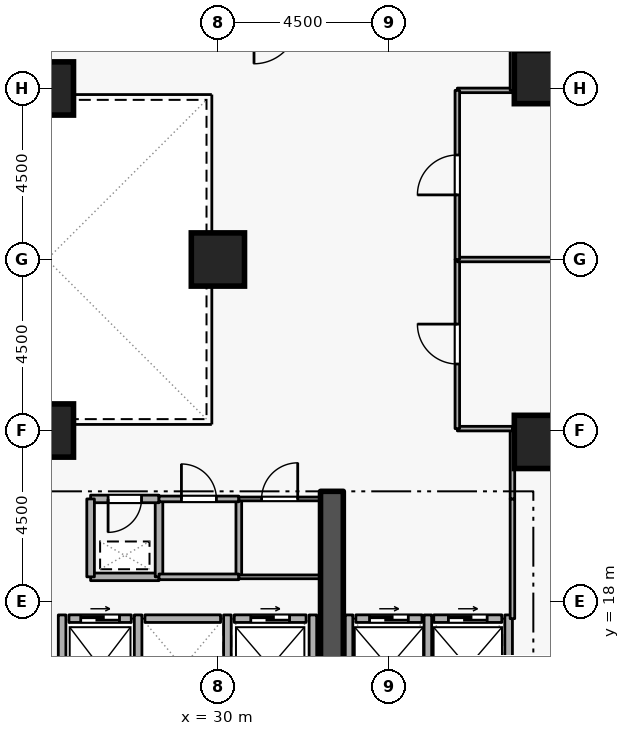
"""IFC4 building model, lengths in metres.
Left out: names, types, materials, properties, quantities, classifications, styles, units other than length and angle.
Written with IfcOpenShell. Run it as: python <this file> out.ifc"""

import sys

from ifc_helpers import new_model, si_unit, direction, frame, frame_2d, origin, origin_2d, place, context, subcontext, project, spatial, rectangle, extrude, element, fill, save


model = new_model("IFC4")
c1 = context("Model", 3, precision=1e-05, world=origin(), true_north=direction((0.0, 1.0)))
c2 = subcontext(c1, "Body", "Model", "MODEL_VIEW")
j1 = project(units=[si_unit("LENGTHUNIT", "METRE"), si_unit("PLANEANGLEUNIT", "RADIAN")], contexts=[c1])
p1 = place(None, origin())
s1 = spatial("IfcSite", under=j1, at=p1, CompositionType="ELEMENT")
p2 = place(p1, origin())
s2 = spatial("IfcBuilding", under=s1, at=p2, CompositionType="ELEMENT")
p3 = place(p2, frame((0.0, 0.0, 49.5)))
s3 = spatial("IfcBuildingStorey", under=s2, at=p3, CompositionType="ELEMENT", Elevation=49.5)
p4 = place(p3, frame((33.0, 15.2, 0.0), z_axis=(0.0, 0.0, 1.0), x_axis=(0.0, 1.0, 0.0)))
e1 = element("IfcWall", 1, at=p4, inside=s3, PredefinedType="SHEAR", context=c2, shape_type="SweptSolid", body=[
    extrude(rectangle(XDim=5.7, YDim=0.6, at=frame_2d((2.85, 0.0))), origin(), (0.0, 0.0, 1.0), 4.2),
])
for number, where, z_axis, x_axis in (
    (2, (38.5, 22.2, 0.0), (0.0, 0.0, 1.0), (1.0, 0.0, 0.0)),
    (3, (38.5, 31.8, 0.0), (0.0, 0.0, 1.0), (1.0, 0.0, 0.0)),
    (4, (25.5, 22.5, 0.0), (0.0, 0.0, 1.0), (1.0, 0.0, 0.0)),
    (5, (25.5, 31.5, 0.0), (0.0, 0.0, 1.0), (1.0, 0.0, 0.0)),
    (6, (30.0, 27.0, 0.0), (0.0, 0.0, 1.0), (1.0, 0.0, 0.0)),
):
    element("IfcColumn", number, at=place(p3, frame(where, z_axis=z_axis, x_axis=x_axis)), inside=s3, PredefinedType="COLUMN", context=c2, shape_type="SweptSolid", body=[
        extrude(rectangle(XDim=1.4, YDim=1.4, at=origin_2d()), origin(), (0.0, 0.0, 1.0), 4.2),
    ])
p5 = place(p3, frame((26.08, 17.55, 0.0), z_axis=(0.0, 0.0, 1.0), x_axis=(1.0, 0.0, 0.0)))
e7 = element("IfcWall", 7, at=p5, inside=s3, PredefinedType="STANDARD", context=c2, shape_type="SweptSolid", body=[
    extrude(rectangle(XDim=1.64, YDim=0.2, at=frame_2d((0.82, 0.0))), origin(), (0.0, 0.0, 1.0), 3.94),
])
p6 = place(p5, frame((0.31, 0.0, 0.0)))
e8 = element("IfcOpeningElement", 8, at=p6, cuts=e7, PredefinedType="OPENING", context=c2, shape_type="SweptSolid", body=[
    extrude(rectangle(XDim=1.02, YDim=2.06, at=frame_2d((0.51, 1.03))), frame((0.0, 0.11, 0.0), z_axis=(0.0, -1.0, 0.0), x_axis=(1.0, 0.0, 0.0)), (0.0, 0.0, 1.0), 0.22),
])
p7 = place(p3, frame((28.08, 17.55, 0.0), z_axis=(0.0, 0.0, 1.0), x_axis=(1.0, 0.0, 0.0)))
e9 = element("IfcWall", 9, at=p7, inside=s3, PredefinedType="STANDARD", context=c2, shape_type="SweptSolid", body=[
    extrude(rectangle(XDim=1.99, YDim=0.2, at=frame_2d((0.995, 0.0))), origin(), (0.0, 0.0, 1.0), 3.94),
])
p8 = place(p3, frame((30.43, 17.55, 0.0), z_axis=(0.0, 0.0, 1.0), x_axis=(1.0, 0.0, 0.0)))
e10 = element("IfcWall", 10, at=p8, inside=s3, PredefinedType="STANDARD", context=c2, shape_type="SweptSolid", body=[
    extrude(rectangle(XDim=1.89, YDim=0.2, at=frame_2d((0.945, 0.0))), origin(), (0.0, 0.0, 1.0), 3.94),
])
p9 = place(p8, frame((0.435, 0.0, 0.0)))
e11 = element("IfcOpeningElement", 11, at=p9, cuts=e10, PredefinedType="OPENING", context=c2, shape_type="SweptSolid", body=[
    extrude(rectangle(XDim=1.02, YDim=2.06, at=frame_2d((0.51, 1.03))), frame((0.0, 0.11, 0.0), z_axis=(0.0, -1.0, 0.0), x_axis=(1.0, 0.0, 0.0)), (0.0, 0.0, 1.0), 0.22),
])
p10 = place(p3, frame((33.63, 17.55, 0.0), z_axis=(0.0, 0.0, 1.0), x_axis=(1.0, 0.0, 0.0)))
e12 = element("IfcWall", 12, at=p10, inside=s3, PredefinedType="STANDARD", context=c2, shape_type="SweptSolid", body=[
    extrude(rectangle(XDim=1.74, YDim=0.2, at=frame_2d((0.87, 0.0))), origin(), (0.0, 0.0, 1.0), 3.94),
])
p11 = place(p10, frame((0.36, 0.0, 0.0)))
e13 = element("IfcOpeningElement", 13, at=p11, cuts=e12, PredefinedType="OPENING", context=c2, shape_type="SweptSolid", body=[
    extrude(rectangle(XDim=1.02, YDim=2.06, at=frame_2d((0.51, 1.03))), frame((0.0, 0.11, 0.0), z_axis=(0.0, -1.0, 0.0), x_axis=(1.0, 0.0, 0.0)), (0.0, 0.0, 1.0), 0.22),
])
p12 = place(p3, frame((35.68, 17.55, 0.0), z_axis=(0.0, 0.0, 1.0), x_axis=(1.0, 0.0, 0.0)))
e14 = element("IfcWall", 14, at=p12, inside=s3, PredefinedType="STANDARD", context=c2, shape_type="SweptSolid", body=[
    extrude(rectangle(XDim=1.79, YDim=0.2, at=frame_2d((0.895, 0.0))), origin(), (0.0, 0.0, 1.0), 3.94),
])
p13 = place(p12, frame((0.385, 0.0, 0.0)))
e15 = element("IfcOpeningElement", 15, at=p13, cuts=e14, PredefinedType="OPENING", context=c2, shape_type="SweptSolid", body=[
    extrude(rectangle(XDim=1.02, YDim=2.06, at=frame_2d((0.51, 1.03))), frame((0.0, 0.11, 0.0), z_axis=(0.0, -1.0, 0.0), x_axis=(1.0, 0.0, 0.0)), (0.0, 0.0, 1.0), 0.22),
])
for number, where, z_axis, x_axis in (
    (16, (27.9, 15.212, 0.0), (0.0, 0.0, 1.0), (0.0, 1.0, 0.0)),
    (17, (25.9, 15.212, 0.0), (0.0, 0.0, 1.0), (0.0, 1.0, 0.0)),
    (18, (30.25, 15.212, 0.0), (0.0, 0.0, 1.0), (0.0, 1.0, 0.0)),
    (19, (32.5, 15.212, 0.0), (0.0, 0.0, 1.0), (0.0, 1.0, 0.0)),
):
    element("IfcWall", number, at=place(p3, frame(where, z_axis=z_axis, x_axis=x_axis)), inside=s3, PredefinedType="STANDARD", context=c2, shape_type="SweptSolid", body=[
        extrude(rectangle(XDim=2.436, YDim=0.2, at=frame_2d((1.218, 0.0))), origin(), (0.0, 0.0, 1.0), 3.94),
    ])
for number, where, z_axis, x_axis in (
    (20, (35.525, 15.012, 0.0), (0.0, 0.0, 1.0), (0.0, 1.0, 0.0)),
    (21, (33.45, 15.012, 0.0), (0.0, 0.0, 1.0), (0.0, 1.0, 0.0)),
    (22, (37.65, 15.012, 0.0), (0.0, 0.0, 1.0), (0.0, 1.0, 0.0)),
):
    element("IfcWall", number, at=place(p3, frame(where, z_axis=z_axis, x_axis=x_axis)), inside=s3, PredefinedType="STANDARD", context=c2, shape_type="SweptSolid", body=[
        extrude(rectangle(XDim=2.636, YDim=0.2, at=frame_2d((1.318, 0.0))), origin(), (0.0, 0.0, 1.0), 3.94),
    ])
p14 = place(p3, frame((26.65, 18.65, 0.0), z_axis=(0.0, 0.0, 1.0), x_axis=(1.0, 0.0, 0.0)))
e23 = element("IfcWall", 23, at=p14, inside=s3, PredefinedType="STANDARD", context=c2, shape_type="SweptSolid", body=[
    extrude(rectangle(XDim=1.8, YDim=0.2, at=frame_2d((0.9, 0.0))), origin(), (0.0, 0.0, 1.0), 3.94),
])
p15 = place(p3, frame((28.45, 18.65, 0.0), z_axis=(0.0, 0.0, 1.0), x_axis=(0.0, 1.0, 0.0)))
e24 = element("IfcWall", 24, at=p15, inside=s3, PredefinedType="STANDARD", context=c2, shape_type="SweptSolid", body=[
    extrude(rectangle(XDim=2.05, YDim=0.2, at=frame_2d((1.025, 0.0))), origin(), (0.0, 0.0, 1.0), 3.94),
])
p16 = place(p3, frame((28.45, 20.7, 0.0), z_axis=(0.0, 0.0, 1.0), x_axis=(-1.0, 0.0, 0.0)))
e25 = element("IfcWall", 25, at=p16, inside=s3, PredefinedType="STANDARD", context=c2, shape_type="SweptSolid", body=[
    extrude(rectangle(XDim=1.8, YDim=0.2, at=frame_2d((0.9, 0.0))), origin(), (0.0, 0.0, 1.0), 3.94),
])
p17 = place(p16, frame((0.46, 0.0, 0.0)))
e26 = element("IfcOpeningElement", 26, at=p17, cuts=e25, PredefinedType="OPENING", context=c2, shape_type="SweptSolid", body=[
    extrude(rectangle(XDim=0.88, YDim=2.04, at=frame_2d((0.44, 1.02))), frame((0.0, 0.11, 0.0), z_axis=(0.0, -1.0, 0.0), x_axis=(1.0, 0.0, 0.0)), (0.0, 0.0, 1.0), 0.22),
])
p18 = place(p3, frame((26.65, 20.7, 0.0), z_axis=(0.0, 0.0, 1.0), x_axis=(0.0, -1.0, 0.0)))
e27 = element("IfcWall", 27, at=p18, inside=s3, PredefinedType="STANDARD", context=c2, shape_type="SweptSolid", body=[
    extrude(rectangle(XDim=2.05, YDim=0.2, at=frame_2d((1.025, 0.0))), origin(), (0.0, 0.0, 1.0), 3.94),
])
p19 = place(p3, frame((30.55, 20.7, 0.0), z_axis=(0.0, 0.0, 1.0), x_axis=(0.0, -1.0, 0.0)))
e28 = element("IfcWall", 28, at=p19, inside=s3, PredefinedType="PARTITIONING", context=c2, shape_type="SweptSolid", body=[
    extrude(rectangle(XDim=2.05, YDim=0.15, at=frame_2d((1.025, 0.0))), origin(), (0.0, 0.0, 1.0), 3.94),
])
p20 = place(p3, frame((30.55, 18.65, 0.0), z_axis=(0.0, 0.0, 1.0), x_axis=(-1.0, 0.0, 0.0)))
e29 = element("IfcWall", 29, at=p20, inside=s3, PredefinedType="PARTITIONING", context=c2, shape_type="SweptSolid", body=[
    extrude(rectangle(XDim=2.1, YDim=0.15, at=frame_2d((1.05, 0.0))), origin(), (0.0, 0.0, 1.0), 3.94),
])
p21 = place(p3, frame((28.45, 20.7, 0.0), z_axis=(0.0, 0.0, 1.0), x_axis=(1.0, 0.0, 0.0)))
e30 = element("IfcWall", 30, at=p21, inside=s3, PredefinedType="PARTITIONING", context=c2, shape_type="SweptSolid", body=[
    extrude(rectangle(XDim=2.1, YDim=0.15, at=frame_2d((1.05, 0.0))), origin(), (0.0, 0.0, 1.0), 3.94),
])
p22 = place(p21, frame((0.59, 0.0, 0.0)))
e31 = element("IfcOpeningElement", 31, at=p22, cuts=e30, PredefinedType="OPENING", context=c2, shape_type="SweptSolid", body=[
    extrude(rectangle(XDim=0.92, YDim=2.08, at=frame_2d((0.46, 1.04))), frame((0.0, 0.085, 0.0), z_axis=(0.0, -1.0, 0.0), x_axis=(1.0, 0.0, 0.0)), (0.0, 0.0, 1.0), 0.17),
])
p23 = place(p3, frame((32.7, 18.65, 0.0), z_axis=(0.0, 0.0, 1.0), x_axis=(-1.0, 0.0, 0.0)))
e32 = element("IfcWall", 32, at=p23, inside=s3, PredefinedType="PARTITIONING", context=c2, shape_type="SweptSolid", body=[
    extrude(rectangle(XDim=2.15, YDim=0.1, at=frame_2d((1.075, 0.0))), origin(), (0.0, 0.0, 1.0), 3.94),
])
p24 = place(p3, frame((30.55, 20.7, 0.0), z_axis=(0.0, 0.0, 1.0), x_axis=(1.0, 0.0, 0.0)))
e33 = element("IfcWall", 33, at=p24, inside=s3, PredefinedType="PARTITIONING", context=c2, shape_type="SweptSolid", body=[
    extrude(rectangle(XDim=2.15, YDim=0.1, at=frame_2d((1.075, 0.0))), origin(), (0.0, 0.0, 1.0), 3.94),
])
p25 = place(p24, frame((0.6, 0.0, 0.0)))
e34 = element("IfcOpeningElement", 34, at=p25, cuts=e33, PredefinedType="OPENING", context=c2, shape_type="SweptSolid", body=[
    extrude(rectangle(XDim=0.95, YDim=2.1, at=frame_2d((0.475, 1.05))), frame((0.0, 0.06, 0.0), z_axis=(0.0, -1.0, 0.0), x_axis=(1.0, 0.0, 0.0)), (0.0, 0.0, 1.0), 0.12),
])
p26 = place(p3, frame((37.75, 17.55, 0.0), z_axis=(0.0, 0.0, 1.0), x_axis=(0.0, 1.0, 0.0)))
e35 = element("IfcWall", 35, at=p26, inside=s3, PredefinedType="PARTITIONING", context=c2, shape_type="SweptSolid", body=[
    extrude(rectangle(XDim=3.15, YDim=0.12, at=frame_2d((1.575, 0.0))), origin(), (0.0, 0.0, 1.0), 3.94),
])
p27 = place(p3, frame((37.75, 20.7, 0.0), z_axis=(0.0, 0.0, 1.0), x_axis=(0.0, 1.0, 0.0)))
e36 = element("IfcWall", 36, at=p27, inside=s3, PredefinedType="PARTITIONING", context=c2, shape_type="SweptSolid", body=[
    extrude(rectangle(XDim=1.85, YDim=0.12, at=frame_2d((0.925, 0.0))), origin(), (0.0, 0.0, 1.0), 3.94),
])
p28 = place(p3, frame((37.75, 22.55, 0.0), z_axis=(0.0, 0.0, 1.0), x_axis=(-1.0, 0.0, 0.0)))
e37 = element("IfcWall", 37, at=p28, inside=s3, PredefinedType="PARTITIONING", context=c2, shape_type="SweptSolid", body=[
    extrude(rectangle(XDim=1.45, YDim=0.12, at=frame_2d((0.725, 0.0))), origin(), (0.0, 0.0, 1.0), 3.94),
])
p29 = place(p3, frame((36.3, 22.55, 0.0), z_axis=(0.0, 0.0, 1.0), x_axis=(0.0, 1.0, 0.0)))
e38 = element("IfcWall", 38, at=p29, inside=s3, PredefinedType="PARTITIONING", context=c2, shape_type="SweptSolid", body=[
    extrude(rectangle(XDim=4.45, YDim=0.12, at=frame_2d((2.225, 0.0))), origin(), (0.0, 0.0, 1.0), 3.94),
])
p30 = place(p29, frame((1.7, 0.0, 0.0)))
e39 = element("IfcOpeningElement", 39, at=p30, cuts=e38, PredefinedType="OPENING", context=c2, shape_type="SweptSolid", body=[
    extrude(rectangle(XDim=1.05, YDim=2.1, at=frame_2d((0.525, 1.05))), frame((0.0, 0.07, 0.0), z_axis=(0.0, -1.0, 0.0), x_axis=(1.0, 0.0, 0.0)), (0.0, 0.0, 1.0), 0.14),
])
p31 = place(p3, frame((36.3, 27.0, 0.0), z_axis=(0.0, 0.0, 1.0), x_axis=(1.0, 0.0, 0.0)))
e40 = element("IfcWall", 40, at=p31, inside=s3, PredefinedType="PARTITIONING", context=c2, shape_type="SweptSolid", body=[
    extrude(rectangle(XDim=13.42, YDim=0.12, at=frame_2d((6.71, 0.0))), origin(), (0.0, 0.0, 1.0), 3.532),
])
p32 = place(p3, frame((36.3, 31.45, 0.0), z_axis=(0.0, 0.0, 1.0), x_axis=(1.0, 0.0, 0.0)))
e41 = element("IfcWall", 41, at=p32, inside=s3, PredefinedType="PARTITIONING", context=c2, shape_type="SweptSolid", body=[
    extrude(rectangle(XDim=1.45, YDim=0.12, at=frame_2d((0.725, 0.0))), origin(), (0.0, 0.0, 1.0), 3.94),
])
p33 = place(p3, frame((37.75, 31.45, 0.0), z_axis=(0.0, 0.0, 1.0), x_axis=(0.0, 1.0, 0.0)))
e42 = element("IfcWall", 42, at=p33, inside=s3, PredefinedType="PARTITIONING", context=c2, shape_type="SweptSolid", body=[
    extrude(rectangle(XDim=1.85, YDim=0.12, at=frame_2d((0.925, 0.0))), origin(), (0.0, 0.0, 1.0), 3.94),
])
p34 = place(p3, frame((36.3, 27.0, 0.0), z_axis=(0.0, 0.0, 1.0), x_axis=(0.0, 1.0, 0.0)))
e43 = element("IfcWall", 43, at=p34, inside=s3, PredefinedType="PARTITIONING", context=c2, shape_type="SweptSolid", body=[
    extrude(rectangle(XDim=4.45, YDim=0.12, at=frame_2d((2.225, 0.0))), origin(), (0.0, 0.0, 1.0), 3.94),
])
p35 = place(p34, frame((1.7, 0.0, 0.0)))
e44 = element("IfcOpeningElement", 44, at=p35, cuts=e43, PredefinedType="OPENING", context=c2, shape_type="SweptSolid", body=[
    extrude(rectangle(XDim=1.05, YDim=2.1, at=frame_2d((0.525, 1.05))), frame((0.0, 0.07, 0.0), z_axis=(0.0, -1.0, 0.0), x_axis=(1.0, 0.0, 0.0)), (0.0, 0.0, 1.0), 0.14),
])
p36 = place(p6, origin())
e45 = element("IfcDoor", 45, at=p36, inside=s3, OperationType="SLIDING_TO_LEFT", PredefinedType="DOOR", context=c2, shape_type="SweptSolid", body=[
    extrude(rectangle(XDim=1.02, YDim=2.06, at=frame_2d((0.51, 1.03))), frame((0.0, 0.025, 0.0), z_axis=(0.0, -1.0, 0.0), x_axis=(1.0, 0.0, 0.0)), (0.0, 0.0, 1.0), 0.05),
])
fill(e8, e45)
p37 = place(p9, origin())
e46 = element("IfcDoor", 46, at=p37, inside=s3, OperationType="SLIDING_TO_LEFT", PredefinedType="DOOR", context=c2, shape_type="SweptSolid", body=[
    extrude(rectangle(XDim=1.02, YDim=2.06, at=frame_2d((0.51, 1.03))), frame((0.0, 0.025, 0.0), z_axis=(0.0, -1.0, 0.0), x_axis=(1.0, 0.0, 0.0)), (0.0, 0.0, 1.0), 0.05),
])
fill(e11, e46)
p38 = place(p11, origin())
e47 = element("IfcDoor", 47, at=p38, inside=s3, OperationType="SLIDING_TO_LEFT", PredefinedType="DOOR", context=c2, shape_type="SweptSolid", body=[
    extrude(rectangle(XDim=1.02, YDim=2.06, at=frame_2d((0.51, 1.03))), frame((0.0, 0.025, 0.0), z_axis=(0.0, -1.0, 0.0), x_axis=(1.0, 0.0, 0.0)), (0.0, 0.0, 1.0), 0.05),
])
fill(e13, e47)
p39 = place(p13, origin())
e48 = element("IfcDoor", 48, at=p39, inside=s3, OperationType="SLIDING_TO_LEFT", PredefinedType="DOOR", context=c2, shape_type="SweptSolid", body=[
    extrude(rectangle(XDim=1.02, YDim=2.06, at=frame_2d((0.51, 1.03))), frame((0.0, 0.025, 0.0), z_axis=(0.0, -1.0, 0.0), x_axis=(1.0, 0.0, 0.0)), (0.0, 0.0, 1.0), 0.05),
])
fill(e15, e48)
p40 = place(p17, origin())
e49 = element("IfcDoor", 49, at=p40, inside=s3, OperationType="SINGLE_SWING_RIGHT", PredefinedType="DOOR", context=c2, shape_type="SweptSolid", body=[
    extrude(rectangle(XDim=0.88, YDim=2.04, at=frame_2d((0.44, 1.02))), frame((0.0, 0.025, 0.0), z_axis=(0.0, -1.0, 0.0), x_axis=(1.0, 0.0, 0.0)), (0.0, 0.0, 1.0), 0.05),
])
fill(e26, e49)
p41 = place(p22, origin())
e50 = element("IfcDoor", 50, at=p41, inside=s3, OperationType="SINGLE_SWING_LEFT", PredefinedType="DOOR", context=c2, shape_type="SweptSolid", body=[
    extrude(rectangle(XDim=0.92, YDim=2.08, at=frame_2d((0.46, 1.04))), frame((0.0, 0.025, 0.0), z_axis=(0.0, -1.0, 0.0), x_axis=(1.0, 0.0, 0.0)), (0.0, 0.0, 1.0), 0.05),
])
fill(e31, e50)
p42 = place(p25, origin())
e51 = element("IfcDoor", 51, at=p42, inside=s3, OperationType="SINGLE_SWING_RIGHT", PredefinedType="DOOR", context=c2, shape_type="SweptSolid", body=[
    extrude(rectangle(XDim=0.95, YDim=2.1, at=frame_2d((0.475, 1.05))), frame((0.0, 0.025, 0.0), z_axis=(0.0, -1.0, 0.0), x_axis=(1.0, 0.0, 0.0)), (0.0, 0.0, 1.0), 0.05),
])
fill(e34, e51)
p43 = place(p30, origin())
e52 = element("IfcDoor", 52, at=p43, inside=s3, OperationType="SINGLE_SWING_RIGHT", PredefinedType="DOOR", context=c2, shape_type="SweptSolid", body=[
    extrude(rectangle(XDim=1.05, YDim=2.1, at=frame_2d((0.525, 1.05))), frame((0.0, 0.025, 0.0), z_axis=(0.0, -1.0, 0.0), x_axis=(1.0, 0.0, 0.0)), (0.0, 0.0, 1.0), 0.05),
])
fill(e39, e52)
p44 = place(p35, origin())
e53 = element("IfcDoor", 53, at=p44, inside=s3, OperationType="SINGLE_SWING_LEFT", PredefinedType="DOOR", context=c2, shape_type="SweptSolid", body=[
    extrude(rectangle(XDim=1.05, YDim=2.1, at=frame_2d((0.525, 1.05))), frame((0.0, 0.025, 0.0), z_axis=(0.0, -1.0, 0.0), x_axis=(1.0, 0.0, 0.0)), (0.0, 0.0, 1.0), 0.05),
])
fill(e44, e53)
save(model, sys.argv[1])
